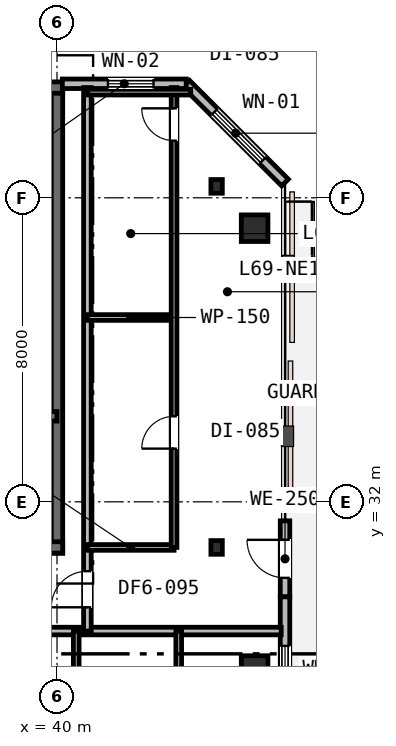
"""IFC4 building model, lengths in metres.
Left out: names, types, materials, properties, quantities, classifications, styles, units other than length and angle.
Written with IfcOpenShell. Run it as: python <this file> out.ifc"""

import sys

from ifc_helpers import new_model, si_unit, direction, frame, frame_2d, origin, origin_2d, place, context, subcontext, project, spatial, rectangle, i_section, extrude, element, fill, save


model = new_model("IFC4")
c1 = context("Model", 3, precision=1e-05, world=origin(), true_north=direction((0.0, 1.0)))
c2 = subcontext(c1, "Body", "Model", "MODEL_VIEW")
j1 = project(units=[si_unit("LENGTHUNIT", "METRE"), si_unit("PLANEANGLEUNIT", "RADIAN")], contexts=[c1])
p1 = place(None, origin())
s1 = spatial("IfcSite", under=j1, at=p1, CompositionType="ELEMENT")
p2 = place(p1, origin())
s2 = spatial("IfcBuilding", under=s1, at=p2, CompositionType="ELEMENT")
p3 = place(p2, frame((0.0, 0.0, 267.8)))
s3 = spatial("IfcBuildingStorey", under=s2, at=p3, CompositionType="ELEMENT", Elevation=267.8)
p4 = place(p3, frame((40.0, 30.65, 0.0), z_axis=(0.0, 0.0, 1.0), x_axis=(0.0, 1.0, 0.0)))
e1 = element("IfcWall", 1, at=p4, inside=s3, PredefinedType="SHEAR", context=c2, shape_type="SweptSolid", body=[
    extrude(rectangle(XDim=12.3, YDim=0.3, at=frame_2d((6.15, 0.0))), origin(), (0.0, 0.0, 1.0), 3.8),
])
p5 = place(p3, frame((15.85, 42.9, 0.0), z_axis=(0.0, 0.0, 1.0), x_axis=(1.0, 0.0, 0.0)))
e2 = element("IfcWall", 2, at=p5, inside=s3, PredefinedType="SHEAR", context=c2, shape_type="SweptSolid", body=[
    extrude(rectangle(XDim=24.3, YDim=0.3, at=frame_2d((12.15, 0.0))), origin(), (0.0, 0.0, 1.0), 3.8),
])
p6 = place(p5, frame((1.6, 0.0, 0.95)))
e3 = element("IfcOpeningElement", 3, at=p6, cuts=e2, PredefinedType="OPENING", context=c2, shape_type="SweptSolid", body=[
    extrude(rectangle(XDim=1.2, YDim=1.6, at=frame_2d((0.6, 0.8))), frame((0.0, 0.16, 0.0), z_axis=(0.0, -1.0, 0.0), x_axis=(1.0, 0.0, 0.0)), (0.0, 0.0, 1.0), 0.32),
])
p7 = place(p5, frame((16.5, 0.0, 0.95)))
e4 = element("IfcOpeningElement", 4, at=p7, cuts=e2, PredefinedType="OPENING", context=c2, shape_type="SweptSolid", body=[
    extrude(rectangle(XDim=1.2, YDim=1.6, at=frame_2d((0.6, 0.8))), frame((0.0, 0.16, 0.0), z_axis=(0.0, -1.0, 0.0), x_axis=(1.0, 0.0, 0.0)), (0.0, 0.0, 1.0), 0.32),
])
p8 = place(p5, frame((21.6, 0.0, 0.95)))
e5 = element("IfcOpeningElement", 5, at=p8, cuts=e2, PredefinedType="OPENING", context=c2, shape_type="SweptSolid", body=[
    extrude(rectangle(XDim=1.2, YDim=1.6, at=frame_2d((0.6, 0.8))), frame((0.0, 0.16, 0.0), z_axis=(0.0, -1.0, 0.0), x_axis=(1.0, 0.0, 0.0)), (0.0, 0.0, 1.0), 0.32),
])
p9 = place(p3, frame((28.95, 30.8, 0.0), z_axis=(0.0, 0.0, 1.0), x_axis=(1.0, 0.0, 0.0)))
e6 = element("IfcWall", 6, at=p9, inside=s3, PredefinedType="SHEAR", context=c2, shape_type="SweptSolid", body=[
    extrude(rectangle(XDim=11.2, YDim=0.3, at=frame_2d((5.6, 0.0))), origin(), (0.0, 0.0, 1.0), 3.8),
])
p10 = place(p9, frame((7.65, 0.0, 0.0)))
e7 = element("IfcOpeningElement", 7, at=p10, cuts=e6, PredefinedType="OPENING", context=c2, shape_type="SweptSolid", body=[
    extrude(rectangle(XDim=1.1, YDim=2.15, at=frame_2d((0.55, 1.075))), frame((0.0, 0.16, 0.0), z_axis=(0.0, -1.0, 0.0), x_axis=(1.0, 0.0, 0.0)), (0.0, 0.0, 1.0), 0.32),
])
p11 = place(p3, frame((33.95, 34.25, 0.0), z_axis=(0.0, 0.0, 1.0), x_axis=(1.0, 0.0, 0.0)))
e8 = element("IfcWall", 8, at=p11, inside=s3, PredefinedType="SHEAR", context=c2, shape_type="SweptSolid", body=[
    extrude(rectangle(XDim=6.05, YDim=0.25, at=frame_2d((3.025, 0.0))), origin(), (0.0, 0.0, 1.0), 3.8),
])
p12 = place(p11, frame((3.7, 0.0, 0.0)))
e9 = element("IfcOpeningElement", 9, at=p12, cuts=e8, PredefinedType="OPENING", context=c2, shape_type="SweptSolid", body=[
    extrude(rectangle(XDim=1.0, YDim=2.15, at=frame_2d((0.5, 1.075))), frame((0.0, 0.135, 0.0), z_axis=(0.0, -1.0, 0.0), x_axis=(1.0, 0.0, 0.0)), (0.0, 0.0, 1.0), 0.27),
])
p13 = place(p11, frame((0.55, 0.0, 0.0)))
e10 = element("IfcOpeningElement", 10, at=p13, cuts=e8, PredefinedType="OPENING", context=c2, shape_type="SweptSolid", body=[
    extrude(rectangle(XDim=1.1, YDim=2.15, at=frame_2d((0.55, 1.075))), frame((0.0, 0.135, 0.0), z_axis=(0.0, -1.0, 0.0), x_axis=(1.0, 0.0, 0.0)), (0.0, 0.0, 1.0), 0.27),
])
for number, where, z_axis, x_axis in (
    (11, (45.2, 27.6, 0.0), (0.0, 0.0, 1.0), (1.0, 0.0, 0.0)),
    (12, (45.2, 39.2, 0.0), (0.0, 0.0, 1.0), (1.0, 0.0, 0.0)),
):
    element("IfcColumn", number, at=place(p3, frame(where, z_axis=z_axis, x_axis=x_axis)), inside=s3, PredefinedType="COLUMN", context=c2, shape_type="SweptSolid", body=[
        extrude(rectangle(XDim=0.7, YDim=0.7, at=origin_2d()), origin(), (0.0, 0.0, 1.0), 3.8),
    ])
for number, where, z_axis, x_axis in (
    (13, (44.2, 30.8, 0.0), (0.0, 0.0, 1.0), (1.0, 0.0, 0.0)),
    (14, (44.2, 40.3, 0.0), (0.0, 0.0, 1.0), (1.0, 0.0, 0.0)),
):
    element("IfcColumn", number, at=place(p3, frame(where, z_axis=z_axis, x_axis=x_axis)), inside=s3, PredefinedType="COLUMN", context=c2, shape_type="SweptSolid", body=[
        extrude(i_section(OverallWidth=0.3, OverallDepth=0.36, WebThickness=0.013, FlangeThickness=0.022, FilletRadius=0.027, at=origin_2d()), origin(), (0.0, 0.0, 1.0), 3.8),
    ])
p14 = place(p3, frame((46.0, 29.5, 0.0), z_axis=(0.0, 0.0, 1.0), x_axis=(0.0, 1.0, 0.0)))
e15 = element("IfcWall", 15, at=p14, inside=s3, PredefinedType="STANDARD", context=c2, shape_type="SweptSolid", body=[
    extrude(rectangle(XDim=2.0, YDim=0.25, at=frame_2d((1.0, 0.0))), origin(), (0.0, 0.0, 1.0), 3.53),
])
p15 = place(p14, frame((0.5, 0.0, 0.0)))
e16 = element("IfcOpeningElement", 16, at=p15, cuts=e15, PredefinedType="OPENING", context=c2, shape_type="SweptSolid", body=[
    extrude(rectangle(XDim=1.0, YDim=2.15, at=frame_2d((0.5, 1.075))), frame((0.0, 0.135, 0.0), z_axis=(0.0, -1.0, 0.0), x_axis=(1.0, 0.0, 0.0)), (0.0, 0.0, 1.0), 0.27),
])
p16 = place(p3, frame((46.0, 26.6, 0.0), z_axis=(0.0, 0.0, 1.0), x_axis=(0.0, 1.0, 0.0)))
e17 = element("IfcWall", 17, at=p16, inside=s3, PredefinedType="STANDARD", context=c2, shape_type="SweptSolid", body=[
    extrude(rectangle(XDim=2.9, YDim=0.25, at=frame_2d((1.45, 0.0))), origin(), (0.0, 0.0, 1.0), 3.53),
])
p17 = place(p16, frame((0.41, 0.0, 0.85)))
e18 = element("IfcOpeningElement", 18, at=p17, cuts=e17, PredefinedType="OPENING", context=c2, shape_type="SweptSolid", body=[
    extrude(rectangle(XDim=1.2, YDim=1.6, at=frame_2d((0.6, 0.8))), frame((0.0, 0.135, 0.0), z_axis=(0.0, -1.0, 0.0), x_axis=(1.0, 0.0, 0.0)), (0.0, 0.0, 1.0), 0.27),
])
p18 = place(p3, frame((46.0, 40.4, 0.0), z_axis=(0.0, 0.0, 1.0), x_axis=(-0.707106781187, 0.707106781187, 0.0)))
e19 = element("IfcWall", 19, at=p18, inside=s3, PredefinedType="STANDARD", context=c2, shape_type="SweptSolid", body=[
    extrude(rectangle(XDim=3.677, YDim=0.25, at=frame_2d((1.839, 0.0))), origin(), (0.0, 0.0, 1.0), 3.53),
])
p19 = place(p18, frame((0.828, 0.0, 0.75)))
e20 = element("IfcOpeningElement", 20, at=p19, cuts=e19, PredefinedType="OPENING", context=c2, shape_type="SweptSolid", body=[
    extrude(rectangle(XDim=1.8, YDim=1.85, at=frame_2d((0.9, 0.925))), frame((0.0, 0.135, 0.0), z_axis=(0.0, -1.0, 0.0), x_axis=(1.0, 0.0, 0.0)), (0.0, 0.0, 1.0), 0.27),
])
p20 = place(p3, frame((43.4, 43.0, 0.0), z_axis=(0.0, 0.0, 1.0), x_axis=(-1.0, 0.0, 0.0)))
e21 = element("IfcWall", 21, at=p20, inside=s3, PredefinedType="STANDARD", context=c2, shape_type="SweptSolid", body=[
    extrude(rectangle(XDim=3.26, YDim=0.25, at=frame_2d((1.63, 0.0))), origin(), (0.0, 0.0, 1.0), 3.53),
])
p21 = place(p20, frame((0.86, 0.0, 0.85)))
e22 = element("IfcOpeningElement", 22, at=p21, cuts=e21, PredefinedType="OPENING", context=c2, shape_type="SweptSolid", body=[
    extrude(rectangle(XDim=1.2, YDim=1.6, at=frame_2d((0.6, 0.8))), frame((0.0, 0.135, 0.0), z_axis=(0.0, -1.0, 0.0), x_axis=(1.0, 0.0, 0.0)), (0.0, 0.0, 1.0), 0.27),
])
p22 = place(p3, frame((20.0, 28.6, 0.0), z_axis=(0.0, 0.0, 1.0), x_axis=(1.0, 0.0, 0.0)))
e23 = element("IfcWall", 23, at=p22, inside=s3, PredefinedType="PARTITIONING", context=c2, shape_type="SweptSolid", body=[
    extrude(rectangle(XDim=25.9, YDim=0.2, at=frame_2d((12.95, 0.0))), origin(), (0.0, 0.0, 1.0), 3.16),
])
p23 = place(p22, frame((7.025, 0.0, 0.0)))
e24 = element("IfcOpeningElement", 24, at=p23, cuts=e23, PredefinedType="OPENING", context=c2, shape_type="SweptSolid", body=[
    extrude(rectangle(XDim=0.95, YDim=2.15, at=frame_2d((0.475, 1.075))), frame((0.0, 0.11, 0.0), z_axis=(0.0, -1.0, 0.0), x_axis=(1.0, 0.0, 0.0)), (0.0, 0.0, 1.0), 0.22),
])
p24 = place(p22, frame((13.625, 0.0, 0.0)))
e25 = element("IfcOpeningElement", 25, at=p24, cuts=e23, PredefinedType="OPENING", context=c2, shape_type="SweptSolid", body=[
    extrude(rectangle(XDim=0.95, YDim=2.15, at=frame_2d((0.475, 1.075))), frame((0.0, 0.11, 0.0), z_axis=(0.0, -1.0, 0.0), x_axis=(1.0, 0.0, 0.0)), (0.0, 0.0, 1.0), 0.22),
])
p25 = place(p22, frame((18.378, 0.0, 0.0)))
e26 = element("IfcOpeningElement", 26, at=p25, cuts=e23, PredefinedType="OPENING", context=c2, shape_type="SweptSolid", body=[
    extrude(rectangle(XDim=0.95, YDim=2.15, at=frame_2d((0.475, 1.075))), frame((0.0, 0.11, 0.0), z_axis=(0.0, -1.0, 0.0), x_axis=(1.0, 0.0, 0.0)), (0.0, 0.0, 1.0), 0.22),
])
p26 = place(p3, frame((40.8, 28.6, 0.0), z_axis=(0.0, 0.0, 1.0), x_axis=(0.0, 1.0, 0.0)))
e27 = element("IfcWall", 27, at=p26, inside=s3, PredefinedType="PARTITIONING", context=c2, shape_type="SweptSolid", body=[
    extrude(rectangle(XDim=14.3, YDim=0.2, at=frame_2d((7.15, 0.0))), origin(), (0.0, 0.0, 1.0), 3.16),
])
p27 = place(p26, frame((0.625, 0.0, 0.0)))
e28 = element("IfcOpeningElement", 28, at=p27, cuts=e27, PredefinedType="OPENING", context=c2, shape_type="SweptSolid", body=[
    extrude(rectangle(XDim=0.95, YDim=2.15, at=frame_2d((0.475, 1.075))), frame((0.0, 0.11, 0.0), z_axis=(0.0, -1.0, 0.0), x_axis=(1.0, 0.0, 0.0)), (0.0, 0.0, 1.0), 0.22),
])
p28 = place(p3, frame((40.8, 30.8, 0.0), z_axis=(0.0, 0.0, 1.0), x_axis=(1.0, 0.0, 0.0)))
e29 = element("IfcWall", 29, at=p28, inside=s3, PredefinedType="PARTITIONING", context=c2, shape_type="SweptSolid", body=[
    extrude(rectangle(XDim=2.28, YDim=0.15, at=frame_2d((1.14, 0.0))), origin(), (0.0, 0.0, 1.0), 3.16),
])
p29 = place(p3, frame((40.8, 36.85, 0.0), z_axis=(0.0, 0.0, 1.0), x_axis=(1.0, 0.0, 0.0)))
e30 = element("IfcWall", 30, at=p29, inside=s3, PredefinedType="PARTITIONING", context=c2, shape_type="SweptSolid", body=[
    extrude(rectangle(XDim=2.28, YDim=0.15, at=frame_2d((1.14, 0.0))), origin(), (0.0, 0.0, 1.0), 3.53),
])
p30 = place(p3, frame((43.08, 30.8, 0.0), z_axis=(0.0, 0.0, 1.0), x_axis=(0.0, 1.0, 0.0)))
e31 = element("IfcWall", 31, at=p30, inside=s3, PredefinedType="PARTITIONING", context=c2, shape_type="SweptSolid", body=[
    extrude(rectangle(XDim=12.1, YDim=0.15, at=frame_2d((6.05, 0.0))), origin(), (0.0, 0.0, 1.0), 3.16),
])
p31 = place(p30, frame((2.6, 0.0, 0.0)))
e32 = element("IfcOpeningElement", 32, at=p31, cuts=e31, PredefinedType="OPENING", context=c2, shape_type="SweptSolid", body=[
    extrude(rectangle(XDim=0.85, YDim=2.15, at=frame_2d((0.425, 1.075))), frame((0.0, 0.085, 0.0), z_axis=(0.0, -1.0, 0.0), x_axis=(1.0, 0.0, 0.0)), (0.0, 0.0, 1.0), 0.17),
])
p32 = place(p30, frame((10.704, 0.0, 0.0)))
e33 = element("IfcOpeningElement", 33, at=p32, cuts=e31, PredefinedType="OPENING", context=c2, shape_type="SweptSolid", body=[
    extrude(rectangle(XDim=0.85, YDim=2.15, at=frame_2d((0.425, 1.075))), frame((0.0, 0.085, 0.0), z_axis=(0.0, -1.0, 0.0), x_axis=(1.0, 0.0, 0.0)), (0.0, 0.0, 1.0), 0.17),
])
p33 = place(p3, frame((40.8, 42.78, 0.0), z_axis=(0.0, 0.0, 1.0), x_axis=(1.0, 0.0, 0.0)))
e34 = element("IfcWall", 34, at=p33, inside=s3, PredefinedType="PARTITIONING", context=c2, shape_type="SweptSolid", body=[
    extrude(rectangle(XDim=2.72, YDim=0.15, at=frame_2d((1.36, 0.0))), origin(), (0.0, 0.0, 1.0), 3.53),
])
for number, where, z_axis, x_axis in (
    (35, (40.506, 26.576, 0.0), (0.0, 0.0, 1.0), (0.0, 1.0, 0.0)),
    (36, (43.203, 26.576, 0.0), (0.0, 0.0, 1.0), (0.0, 1.0, 0.0)),
):
    element("IfcWall", number, at=place(p3, frame(where, z_axis=z_axis, x_axis=x_axis)), inside=s3, PredefinedType="PARTITIONING", context=c2, shape_type="SweptSolid", body=[
        extrude(rectangle(XDim=2.024, YDim=0.15, at=frame_2d((1.012, 0.0))), origin(), (0.0, 0.0, 1.0), 3.53),
    ])
p34 = place(p15, origin())
e37 = element("IfcDoor", 37, at=p34, inside=s3, OperationType="SINGLE_SWING_RIGHT", PredefinedType="DOOR", context=c2, shape_type="SweptSolid", body=[
    extrude(rectangle(XDim=1.0, YDim=2.15, at=frame_2d((0.5, 1.075))), frame((0.0, 0.025, 0.0), z_axis=(0.0, -1.0, 0.0), x_axis=(1.0, 0.0, 0.0)), (0.0, 0.0, 1.0), 0.05),
])
fill(e16, e37)
p35 = place(p17, origin())
e38 = element("IfcWindow", 38, at=p35, inside=s3, PartitioningType="SINGLE_PANEL", PredefinedType="WINDOW", context=c2, shape_type="SweptSolid", body=[
    extrude(rectangle(XDim=1.2, YDim=1.6, at=frame_2d((0.6, 0.8))), frame((0.0, 0.03, 0.0), z_axis=(0.0, -1.0, 0.0), x_axis=(1.0, 0.0, 0.0)), (0.0, 0.0, 1.0), 0.06),
])
fill(e18, e38)
p36 = place(p19, origin())
e39 = element("IfcWindow", 39, at=p36, inside=s3, PartitioningType="SINGLE_PANEL", PredefinedType="WINDOW", context=c2, shape_type="SweptSolid", body=[
    extrude(rectangle(XDim=1.8, YDim=1.85, at=frame_2d((0.9, 0.925))), frame((0.0, 0.03, 0.0), z_axis=(0.0, -1.0, 0.0), x_axis=(1.0, 0.0, 0.0)), (0.0, 0.0, 1.0), 0.06),
])
fill(e20, e39)
p37 = place(p21, origin())
e40 = element("IfcWindow", 40, at=p37, inside=s3, PartitioningType="SINGLE_PANEL", PredefinedType="WINDOW", context=c2, shape_type="SweptSolid", body=[
    extrude(rectangle(XDim=1.2, YDim=1.6, at=frame_2d((0.6, 0.8))), frame((0.0, 0.03, 0.0), z_axis=(0.0, -1.0, 0.0), x_axis=(1.0, 0.0, 0.0)), (0.0, 0.0, 1.0), 0.06),
])
fill(e22, e40)
p38 = place(p27, origin())
e41 = element("IfcDoor", 41, at=p38, inside=s3, OperationType="SINGLE_SWING_LEFT", PredefinedType="DOOR", context=c2, shape_type="SweptSolid", body=[
    extrude(rectangle(XDim=0.95, YDim=2.15, at=frame_2d((0.475, 1.075))), frame((0.0, 0.025, 0.0), z_axis=(0.0, -1.0, 0.0), x_axis=(1.0, 0.0, 0.0)), (0.0, 0.0, 1.0), 0.05),
])
fill(e28, e41)
p39 = place(p31, origin())
e42 = element("IfcDoor", 42, at=p39, inside=s3, OperationType="SINGLE_SWING_LEFT", PredefinedType="DOOR", context=c2, shape_type="SweptSolid", body=[
    extrude(rectangle(XDim=0.85, YDim=2.15, at=frame_2d((0.425, 1.075))), frame((0.0, 0.025, 0.0), z_axis=(0.0, -1.0, 0.0), x_axis=(1.0, 0.0, 0.0)), (0.0, 0.0, 1.0), 0.05),
])
fill(e32, e42)
p40 = place(p32, origin())
e43 = element("IfcDoor", 43, at=p40, inside=s3, OperationType="SINGLE_SWING_RIGHT", PredefinedType="DOOR", context=c2, shape_type="SweptSolid", body=[
    extrude(rectangle(XDim=0.85, YDim=2.15, at=frame_2d((0.425, 1.075))), frame((0.0, 0.025, 0.0), z_axis=(0.0, -1.0, 0.0), x_axis=(1.0, 0.0, 0.0)), (0.0, 0.0, 1.0), 0.05),
])
fill(e33, e43)
save(model, sys.argv[1])
